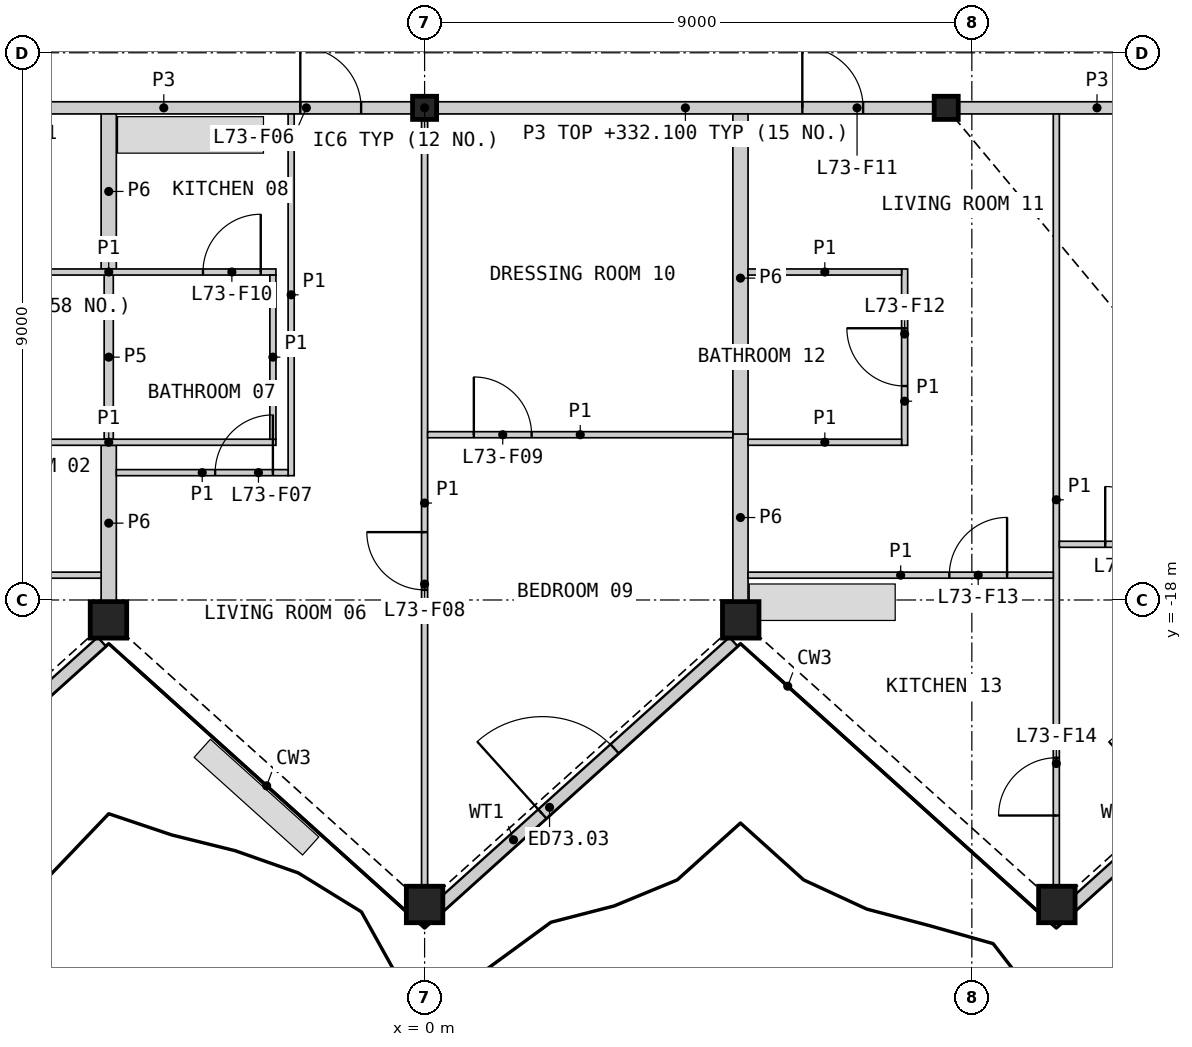
"""IFC4 building model, lengths in metres.
Left out: names, types, materials, properties, quantities, classifications, styles, units other than length and angle.
Written with IfcOpenShell. Run it as: python <this file> out.ifc"""

import sys

from ifc_helpers import new_model, si_unit, direction, frame, frame_2d, origin, origin_2d, place, context, subcontext, project, spatial, rectangle, hollow_rectangle, i_section, extrude, element, fill, save


model = new_model("IFC4")
c1 = context("Model", 3, precision=1e-05, world=origin(), true_north=direction((0.0, 1.0)))
c2 = subcontext(c1, "Body", "Model", "MODEL_VIEW")
j1 = project(units=[si_unit("LENGTHUNIT", "METRE"), si_unit("PLANEANGLEUNIT", "RADIAN")], contexts=[c1])
p1 = place(None, origin())
s1 = spatial("IfcSite", under=j1, at=p1, CompositionType="ELEMENT")
p2 = place(p1, origin())
s2 = spatial("IfcBuilding", under=s1, at=p2, CompositionType="ELEMENT")
p3 = place(p2, frame((0.0, 0.0, 329.0)))
s3 = spatial("IfcBuildingStorey", under=s2, at=p3, CompositionType="ELEMENT", Elevation=329.0)
for number, where, z_axis, x_axis in (
    (1, (-5.199, -18.327, 0.0), (0.0, 0.0, 1.0), (1.0, 0.0, 0.0)),
    (2, (0.0, -23.008, 0.0), (0.0, 0.0, 1.0), (1.0, 0.0, 0.0)),
    (3, (5.199, -18.327, 0.0), (0.0, 0.0, 1.0), (1.0, 0.0, 0.0)),
    (4, (10.398, -23.008, 0.0), (0.0, 0.0, 1.0), (1.0, 0.0, 0.0)),
):
    element("IfcColumn", number, at=place(p3, frame(where, z_axis=z_axis, x_axis=x_axis)), inside=s3, PredefinedType="COLUMN", context=c2, shape_type="SweptSolid", body=[
        extrude(hollow_rectangle(XDim=0.6, YDim=0.6, WallThickness=0.04, at=origin_2d()), origin(), (0.0, 0.0, 1.0), 3.4),
    ])
for number, where, z_axis, x_axis in (
    (5, (0.0, -9.906, 0.0), (0.0, 0.0, 1.0), (1.0, 0.0, 0.0)),
    (6, (8.578, -9.906, 0.0), (0.0, 0.0, 1.0), (1.0, 0.0, 0.0)),
):
    element("IfcColumn", number, at=place(p3, frame(where, z_axis=z_axis, x_axis=x_axis)), inside=s3, PredefinedType="COLUMN", context=c2, shape_type="SweptSolid", body=[
        extrude(i_section(OverallWidth=0.396, OverallDepth=0.381, WebThickness=0.019, FlangeThickness=0.03, at=origin_2d()), origin(), (0.0, 0.0, 1.0), 3.4),
    ])
p4 = place(p3, frame((-10.134, -23.031, 0.0), z_axis=(0.0, 0.0, 1.0), x_axis=(0.743138937876, 0.669137145145, 0.0)))
e7 = element("IfcWall", 7, at=p4, inside=s3, PredefinedType="SOLIDWALL", context=c2, shape_type="SweptSolid", body=[
    extrude(rectangle(XDim=6.493, YDim=0.2, at=frame_2d((3.246, 0.0))), origin(), (0.0, 0.0, 1.0), 2.488),
])
p5 = place(p4, frame((2.261, 0.0, 0.0)))
e8 = element("IfcOpeningElement", 8, at=p5, cuts=e7, PredefinedType="OPENING", context=c2, shape_type="SweptSolid", body=[
    extrude(rectangle(XDim=1.6, YDim=2.25, at=frame_2d((0.8, 1.125))), frame((0.0, 0.11, 0.0), z_axis=(0.0, -1.0, 0.0), x_axis=(1.0, 0.0, 0.0)), (0.0, 0.0, 1.0), 0.22),
])
p6 = place(p3, frame((0.256, -23.031, 0.0), z_axis=(0.0, 0.0, 1.0), x_axis=(0.743138937876, 0.669137145145, 0.0)))
e9 = element("IfcWall", 9, at=p6, inside=s3, PredefinedType="SOLIDWALL", context=c2, shape_type="SweptSolid", body=[
    extrude(rectangle(XDim=6.493, YDim=0.2, at=frame_2d((3.246, 0.0))), origin(), (0.0, 0.0, 1.0), 2.488),
])
p7 = place(p6, frame((2.261, 0.0, 0.0)))
e10 = element("IfcOpeningElement", 10, at=p7, cuts=e9, PredefinedType="OPENING", context=c2, shape_type="SweptSolid", body=[
    extrude(rectangle(XDim=1.6, YDim=2.25, at=frame_2d((0.8, 1.125))), frame((0.0, 0.11, 0.0), z_axis=(0.0, -1.0, 0.0), x_axis=(1.0, 0.0, 0.0)), (0.0, 0.0, 1.0), 0.22),
])
p8 = place(p3, frame((10.645, -23.031, 0.0), z_axis=(0.0, 0.0, 1.0), x_axis=(0.743138937876, 0.669137145145, 0.0)))
e11 = element("IfcWall", 11, at=p8, inside=s3, PredefinedType="SOLIDWALL", context=c2, shape_type="SweptSolid", body=[
    extrude(rectangle(XDim=6.493, YDim=0.2, at=frame_2d((3.246, 0.0))), origin(), (0.0, 0.0, 1.0), 2.488),
])
p9 = place(p8, frame((2.261, 0.0, 0.0)))
e12 = element("IfcOpeningElement", 12, at=p9, cuts=e11, PredefinedType="OPENING", context=c2, shape_type="SweptSolid", body=[
    extrude(rectangle(XDim=1.6, YDim=2.25, at=frame_2d((0.8, 1.125))), frame((0.0, 0.11, 0.0), z_axis=(0.0, -1.0, 0.0), x_axis=(1.0, 0.0, 0.0)), (0.0, 0.0, 1.0), 0.22),
])
p10 = place(p3, frame((0.208, -9.906, 0.0), z_axis=(0.0, 0.0, 1.0), x_axis=(1.0, 0.0, 0.0)))
e13 = element("IfcWall", 13, at=p10, inside=s3, PredefinedType="PARTITIONING", context=c2, shape_type="SweptSolid", body=[
    extrude(rectangle(XDim=8.163, YDim=0.2, at=frame_2d((4.082, 0.0))), origin(), (0.0, 0.0, 1.0), 3.1),
])
p11 = place(p10, frame((6.004, 0.0, 0.0)))
e14 = element("IfcOpeningElement", 14, at=p11, cuts=e13, PredefinedType="OPENING", context=c2, shape_type="SweptSolid", body=[
    extrude(rectangle(XDim=1.0, YDim=2.1, at=frame_2d((0.5, 1.05))), frame((0.0, 0.11, 0.0), z_axis=(0.0, -1.0, 0.0), x_axis=(1.0, 0.0, 0.0)), (0.0, 0.0, 1.0), 0.22),
])
p12 = place(p3, frame((-8.371, -9.906, 0.0), z_axis=(0.0, 0.0, 1.0), x_axis=(1.0, 0.0, 0.0)))
e15 = element("IfcWall", 15, at=p12, inside=s3, PredefinedType="PARTITIONING", context=c2, shape_type="SweptSolid", body=[
    extrude(rectangle(XDim=8.163, YDim=0.2, at=frame_2d((4.082, 0.0))), origin(), (0.0, 0.0, 1.0), 3.1),
])
p13 = place(p12, frame((1.159, 0.0, 0.0)))
e16 = element("IfcOpeningElement", 16, at=p13, cuts=e15, PredefinedType="OPENING", context=c2, shape_type="SweptSolid", body=[
    extrude(rectangle(XDim=1.0, YDim=2.1, at=frame_2d((0.5, 1.05))), frame((0.0, 0.11, 0.0), z_axis=(0.0, -1.0, 0.0), x_axis=(1.0, 0.0, 0.0)), (0.0, 0.0, 1.0), 0.22),
])
p14 = place(p12, frame((6.327, 0.0, 0.0)))
e17 = element("IfcOpeningElement", 17, at=p14, cuts=e15, PredefinedType="OPENING", context=c2, shape_type="SweptSolid", body=[
    extrude(rectangle(XDim=1.0, YDim=2.1, at=frame_2d((0.5, 1.05))), frame((0.0, 0.11, 0.0), z_axis=(0.0, -1.0, 0.0), x_axis=(1.0, 0.0, 0.0)), (0.0, 0.0, 1.0), 0.22),
])
p15 = place(p3, frame((5.195, -15.407, 0.0), z_axis=(0.0, 0.0, 1.0), x_axis=(0.0, 1.0, 0.0)))
e18 = element("IfcWall", 18, at=p15, inside=s3, PredefinedType="PARTITIONING", context=c2, shape_type="SweptSolid", body=[
    extrude(rectangle(XDim=5.401, YDim=0.25, at=frame_2d((2.701, 0.0))), origin(), (0.0, 0.0, 1.0), 2.33),
])
p16 = place(p3, frame((8.786, -9.906, 0.0), z_axis=(0.0, 0.0, 1.0), x_axis=(1.0, 0.0, 0.0)))
e19 = element("IfcWall", 19, at=p16, inside=s3, PredefinedType="PARTITIONING", context=c2, shape_type="SweptSolid", body=[
    extrude(rectangle(XDim=4.545, YDim=0.2, at=frame_2d((2.272, 0.0))), origin(), (0.0, 0.0, 1.0), 3.1),
])
p17 = place(p3, frame((-5.195, -12.556, 0.0), z_axis=(0.0, 0.0, 1.0), x_axis=(0.0, 1.0, 0.0)))
e20 = element("IfcWall", 20, at=p17, inside=s3, PredefinedType="PARTITIONING", context=c2, shape_type="SweptSolid", body=[
    extrude(rectangle(XDim=2.55, YDim=0.25, at=frame_2d((1.275, 0.0))), origin(), (0.0, 0.0, 1.0), 2.33),
])
p18 = place(p3, frame((5.195, -18.017, 0.0), z_axis=(0.0, 0.0, 1.0), x_axis=(0.0, 1.0, 0.0)))
e21 = element("IfcWall", 21, at=p18, inside=s3, PredefinedType="PARTITIONING", context=c2, shape_type="SweptSolid", body=[
    extrude(rectangle(XDim=2.746, YDim=0.25, at=frame_2d((1.373, 0.0))), origin(), (0.0, 0.0, 1.0), 2.33),
])
p19 = place(p3, frame((-5.195, -18.017, 0.0), z_axis=(0.0, 0.0, 1.0), x_axis=(0.0, 1.0, 0.0)))
e22 = element("IfcWall", 22, at=p19, inside=s3, PredefinedType="PARTITIONING", context=c2, shape_type="SweptSolid", body=[
    extrude(rectangle(XDim=2.561, YDim=0.25, at=frame_2d((1.281, 0.0))), origin(), (0.0, 0.0, 1.0), 2.33),
])
p20 = place(p3, frame((-5.195, -15.356, 0.0), z_axis=(0.0, 0.0, 1.0), x_axis=(0.0, 1.0, 0.0)))
e23 = element("IfcWall", 23, at=p20, inside=s3, PredefinedType="PLUMBINGWALL", context=c2, shape_type="SweptSolid", body=[
    extrude(rectangle(XDim=2.7, YDim=0.15, at=frame_2d((1.35, 0.0))), origin(), (0.0, 0.0, 1.0), 2.33),
])
p21 = place(p3, frame((10.389, -22.698, 0.0), z_axis=(0.0, 0.0, 1.0), x_axis=(0.0, 1.0, 0.0)))
e24 = element("IfcWall", 24, at=p21, inside=s3, PredefinedType="PARTITIONING", context=c2, shape_type="SweptSolid", body=[
    extrude(rectangle(XDim=12.692, YDim=0.1, at=frame_2d((6.346, 0.0))), origin(), (0.0, 0.0, 1.0), 2.33),
])
p22 = place(p21, frame((1.153, 0.0, 0.0)))
e25 = element("IfcOpeningElement", 25, at=p22, cuts=e24, PredefinedType="OPENING", context=c2, shape_type="SweptSolid", body=[
    extrude(rectangle(XDim=0.95, YDim=2.1, at=frame_2d((0.475, 1.05))), frame((0.0, 0.06, 0.0), z_axis=(0.0, -1.0, 0.0), x_axis=(1.0, 0.0, 0.0)), (0.0, 0.0, 1.0), 0.12),
])
p23 = place(p3, frame((0.0, -22.698, 0.0), z_axis=(0.0, 0.0, 1.0), x_axis=(0.0, 1.0, 0.0)))
e26 = element("IfcWall", 26, at=p23, inside=s3, PredefinedType="PARTITIONING", context=c2, shape_type="SweptSolid", body=[
    extrude(rectangle(XDim=12.585, YDim=0.1, at=frame_2d((6.292, 0.0))), origin(), (0.0, 0.0, 1.0), 2.33),
])
p24 = place(p23, frame((4.865, 0.0, 0.0)))
e27 = element("IfcOpeningElement", 27, at=p24, cuts=e26, PredefinedType="OPENING", context=c2, shape_type="SweptSolid", body=[
    extrude(rectangle(XDim=0.95, YDim=2.1, at=frame_2d((0.475, 1.05))), frame((0.0, 0.06, 0.0), z_axis=(0.0, -1.0, 0.0), x_axis=(1.0, 0.0, 0.0)), (0.0, 0.0, 1.0), 0.12),
])
p25 = place(p3, frame((10.439, -17.084, 0.0), z_axis=(0.0, 0.0, 1.0), x_axis=(1.0, 0.0, 0.0)))
e28 = element("IfcWall", 28, at=p25, inside=s3, PredefinedType="PARTITIONING", context=c2, shape_type="SweptSolid", body=[
    extrude(rectangle(XDim=6.693, YDim=0.1, at=frame_2d((3.346, 0.0))), origin(), (0.0, 0.0, 1.0), 2.33),
])
p26 = place(p25, frame((0.754, 0.0, 0.0)))
e29 = element("IfcOpeningElement", 29, at=p26, cuts=e28, PredefinedType="OPENING", context=c2, shape_type="SweptSolid", body=[
    extrude(rectangle(XDim=0.95, YDim=2.1, at=frame_2d((0.475, 1.05))), frame((0.0, 0.06, 0.0), z_axis=(0.0, -1.0, 0.0), x_axis=(1.0, 0.0, 0.0)), (0.0, 0.0, 1.0), 0.12),
])
p27 = place(p3, frame((-2.195, -15.956, 0.0), z_axis=(0.0, 0.0, 1.0), x_axis=(0.0, 1.0, 0.0)))
e30 = element("IfcWall", 30, at=p27, inside=s3, PredefinedType="PARTITIONING", context=c2, shape_type="SweptSolid", body=[
    extrude(rectangle(XDim=5.95, YDim=0.1, at=frame_2d((2.975, 0.0))), origin(), (0.0, 0.0, 1.0), 2.33),
])
p28 = place(p3, frame((-7.945, -12.606, 0.0), z_axis=(0.0, 0.0, 1.0), x_axis=(1.0, 0.0, 0.0)))
e31 = element("IfcWall", 31, at=p28, inside=s3, PredefinedType="PARTITIONING", context=c2, shape_type="SweptSolid", body=[
    extrude(rectangle(XDim=5.5, YDim=0.1, at=frame_2d((2.75, 0.0))), origin(), (0.0, 0.0, 1.0), 2.33),
])
p29 = place(p28, frame((4.3, 0.0, 0.0)))
e32 = element("IfcOpeningElement", 32, at=p29, cuts=e31, PredefinedType="OPENING", context=c2, shape_type="SweptSolid", body=[
    extrude(rectangle(XDim=0.95, YDim=2.1, at=frame_2d((0.475, 1.05))), frame((0.0, 0.06, 0.0), z_axis=(0.0, -1.0, 0.0), x_axis=(1.0, 0.0, 0.0)), (0.0, 0.0, 1.0), 0.12),
])
p30 = place(p3, frame((-7.945, -15.406, 0.0), z_axis=(0.0, 0.0, 1.0), x_axis=(1.0, 0.0, 0.0)))
e33 = element("IfcWall", 33, at=p30, inside=s3, PredefinedType="PARTITIONING", context=c2, shape_type="SweptSolid", body=[
    extrude(rectangle(XDim=5.5, YDim=0.1, at=frame_2d((2.75, 0.0))), origin(), (0.0, 0.0, 1.0), 2.33),
])
p31 = place(p3, frame((-10.339, -17.592, 0.0), z_axis=(0.0, 0.0, 1.0), x_axis=(1.0, 0.0, 0.0)))
e34 = element("IfcWall", 34, at=p31, inside=s3, PredefinedType="PARTITIONING", context=c2, shape_type="SweptSolid", body=[
    extrude(rectangle(XDim=5.02, YDim=0.1, at=frame_2d((2.51, 0.0))), origin(), (0.0, 0.0, 1.0), 2.33),
])
p32 = place(p31, frame((0.76, 0.0, 0.0)))
e35 = element("IfcOpeningElement", 35, at=p32, cuts=e34, PredefinedType="OPENING", context=c2, shape_type="SweptSolid", body=[
    extrude(rectangle(XDim=0.95, YDim=2.1, at=frame_2d((0.475, 1.05))), frame((0.0, 0.06, 0.0), z_axis=(0.0, -1.0, 0.0), x_axis=(1.0, 0.0, 0.0)), (0.0, 0.0, 1.0), 0.12),
])
p33 = place(p3, frame((5.32, -17.592, 0.0), z_axis=(0.0, 0.0, 1.0), x_axis=(1.0, 0.0, 0.0)))
e36 = element("IfcWall", 36, at=p33, inside=s3, PredefinedType="PARTITIONING", context=c2, shape_type="SweptSolid", body=[
    extrude(rectangle(XDim=5.02, YDim=0.1, at=frame_2d((2.51, 0.0))), origin(), (0.0, 0.0, 1.0), 2.33),
])
p34 = place(p33, frame((3.31, 0.0, 0.0)))
e37 = element("IfcOpeningElement", 37, at=p34, cuts=e36, PredefinedType="OPENING", context=c2, shape_type="SweptSolid", body=[
    extrude(rectangle(XDim=0.95, YDim=2.1, at=frame_2d((0.475, 1.05))), frame((0.0, 0.06, 0.0), z_axis=(0.0, -1.0, 0.0), x_axis=(1.0, 0.0, 0.0)), (0.0, 0.0, 1.0), 0.12),
])
p35 = place(p3, frame((0.05, -15.282, 0.0), z_axis=(0.0, 0.0, 1.0), x_axis=(1.0, 0.0, 0.0)))
e38 = element("IfcWall", 38, at=p35, inside=s3, PredefinedType="PARTITIONING", context=c2, shape_type="SweptSolid", body=[
    extrude(rectangle(XDim=5.02, YDim=0.1, at=frame_2d((2.51, 0.0))), origin(), (0.0, 0.0, 1.0), 2.33),
])
p36 = place(p35, frame((0.76, 0.0, 0.0)))
e39 = element("IfcOpeningElement", 39, at=p36, cuts=e38, PredefinedType="OPENING", context=c2, shape_type="SweptSolid", body=[
    extrude(rectangle(XDim=0.95, YDim=2.1, at=frame_2d((0.475, 1.05))), frame((0.0, 0.06, 0.0), z_axis=(0.0, -1.0, 0.0), x_axis=(1.0, 0.0, 0.0)), (0.0, 0.0, 1.0), 0.12),
])
p37 = place(p3, frame((-5.07, -15.906, 0.0), z_axis=(0.0, 0.0, 1.0), x_axis=(1.0, 0.0, 0.0)))
e40 = element("IfcWall", 40, at=p37, inside=s3, PredefinedType="PARTITIONING", context=c2, shape_type="SweptSolid", body=[
    extrude(rectangle(XDim=2.825, YDim=0.1, at=frame_2d((1.413, 0.0))), origin(), (0.0, 0.0, 1.0), 2.33),
])
p38 = place(p37, frame((1.625, 0.0, 0.0)))
e41 = element("IfcOpeningElement", 41, at=p38, cuts=e40, PredefinedType="OPENING", context=c2, shape_type="SweptSolid", body=[
    extrude(rectangle(XDim=0.95, YDim=2.1, at=frame_2d((0.475, 1.05))), frame((0.0, 0.06, 0.0), z_axis=(0.0, -1.0, 0.0), x_axis=(1.0, 0.0, 0.0)), (0.0, 0.0, 1.0), 0.12),
])
p39 = place(p3, frame((-2.495, -15.356, 0.0), z_axis=(0.0, 0.0, 1.0), x_axis=(0.0, 1.0, 0.0)))
e42 = element("IfcWall", 42, at=p39, inside=s3, PredefinedType="PARTITIONING", context=c2, shape_type="SweptSolid", body=[
    extrude(rectangle(XDim=2.7, YDim=0.1, at=frame_2d((1.35, 0.0))), origin(), (0.0, 0.0, 1.0), 2.33),
])
p40 = place(p3, frame((7.895, -15.456, 0.0), z_axis=(0.0, 0.0, 1.0), x_axis=(0.0, 1.0, 0.0)))
e43 = element("IfcWall", 43, at=p40, inside=s3, PredefinedType="PARTITIONING", context=c2, shape_type="SweptSolid", body=[
    extrude(rectangle(XDim=2.9, YDim=0.1, at=frame_2d((1.45, 0.0))), origin(), (0.0, 0.0, 1.0), 2.33),
])
p41 = place(p40, frame((0.975, 0.0, 0.0)))
e44 = element("IfcOpeningElement", 44, at=p41, cuts=e43, PredefinedType="OPENING", context=c2, shape_type="SweptSolid", body=[
    extrude(rectangle(XDim=0.95, YDim=2.1, at=frame_2d((0.475, 1.05))), frame((0.0, 0.06, 0.0), z_axis=(0.0, -1.0, 0.0), x_axis=(1.0, 0.0, 0.0)), (0.0, 0.0, 1.0), 0.12),
])
for number, where, z_axis, x_axis in (
    (45, (5.32, -12.606, 0.0), (0.0, 0.0, 1.0), (1.0, 0.0, 0.0)),
    (46, (5.32, -15.406, 0.0), (0.0, 0.0, 1.0), (1.0, 0.0, 0.0)),
):
    element("IfcWall", number, at=place(p3, frame(where, z_axis=z_axis, x_axis=x_axis)), inside=s3, PredefinedType="PARTITIONING", context=c2, shape_type="SweptSolid", body=[
        extrude(rectangle(XDim=2.525, YDim=0.1, at=frame_2d((1.263, 0.0))), origin(), (0.0, 0.0, 1.0), 2.33),
    ])
p42 = place(p7, origin())
e47 = element("IfcDoor", 47, at=p42, inside=s3, OperationType="DOUBLE_DOOR_SINGLE_SWING", PredefinedType="DOOR", context=c2, shape_type="SweptSolid", body=[
    extrude(rectangle(XDim=1.6, YDim=2.25, at=frame_2d((0.8, 1.125))), frame((0.0, 0.025, 0.0), z_axis=(0.0, -1.0, 0.0), x_axis=(1.0, 0.0, 0.0)), (0.0, 0.0, 1.0), 0.05),
])
fill(e10, e47)
p43 = place(p14, origin())
e48 = element("IfcDoor", 48, at=p43, inside=s3, OperationType="SINGLE_SWING_LEFT", PredefinedType="DOOR", context=c2, shape_type="SweptSolid", body=[
    extrude(rectangle(XDim=1.0, YDim=2.1, at=frame_2d((0.5, 1.05))), frame((0.0, 0.025, 0.0), z_axis=(0.0, -1.0, 0.0), x_axis=(1.0, 0.0, 0.0)), (0.0, 0.0, 1.0), 0.05),
])
fill(e17, e48)
p44 = place(p38, origin())
e49 = element("IfcDoor", 49, at=p44, inside=s3, OperationType="SINGLE_SWING_RIGHT", PredefinedType="DOOR", context=c2, shape_type="SweptSolid", body=[
    extrude(rectangle(XDim=0.95, YDim=2.1, at=frame_2d((0.475, 1.05))), frame((0.0, 0.025, 0.0), z_axis=(0.0, -1.0, 0.0), x_axis=(1.0, 0.0, 0.0)), (0.0, 0.0, 1.0), 0.05),
])
fill(e41, e49)
p45 = place(p24, origin())
e50 = element("IfcDoor", 50, at=p45, inside=s3, OperationType="SINGLE_SWING_RIGHT", PredefinedType="DOOR", context=c2, shape_type="SweptSolid", body=[
    extrude(rectangle(XDim=0.95, YDim=2.1, at=frame_2d((0.475, 1.05))), frame((0.0, 0.025, 0.0), z_axis=(0.0, -1.0, 0.0), x_axis=(1.0, 0.0, 0.0)), (0.0, 0.0, 1.0), 0.05),
])
fill(e27, e50)
p46 = place(p36, origin())
e51 = element("IfcDoor", 51, at=p46, inside=s3, OperationType="SINGLE_SWING_LEFT", PredefinedType="DOOR", context=c2, shape_type="SweptSolid", body=[
    extrude(rectangle(XDim=0.95, YDim=2.1, at=frame_2d((0.475, 1.05))), frame((0.0, 0.025, 0.0), z_axis=(0.0, -1.0, 0.0), x_axis=(1.0, 0.0, 0.0)), (0.0, 0.0, 1.0), 0.05),
])
fill(e39, e51)
p47 = place(p29, origin())
e52 = element("IfcDoor", 52, at=p47, inside=s3, OperationType="SINGLE_SWING_RIGHT", PredefinedType="DOOR", context=c2, shape_type="SweptSolid", body=[
    extrude(rectangle(XDim=0.95, YDim=2.1, at=frame_2d((0.475, 1.05))), frame((0.0, 0.025, 0.0), z_axis=(0.0, -1.0, 0.0), x_axis=(1.0, 0.0, 0.0)), (0.0, 0.0, 1.0), 0.05),
])
fill(e32, e52)
p48 = place(p11, origin())
e53 = element("IfcDoor", 53, at=p48, inside=s3, OperationType="SINGLE_SWING_LEFT", PredefinedType="DOOR", context=c2, shape_type="SweptSolid", body=[
    extrude(rectangle(XDim=1.0, YDim=2.1, at=frame_2d((0.5, 1.05))), frame((0.0, 0.025, 0.0), z_axis=(0.0, -1.0, 0.0), x_axis=(1.0, 0.0, 0.0)), (0.0, 0.0, 1.0), 0.05),
])
fill(e14, e53)
p49 = place(p41, origin())
e54 = element("IfcDoor", 54, at=p49, inside=s3, OperationType="SINGLE_SWING_RIGHT", PredefinedType="DOOR", context=c2, shape_type="SweptSolid", body=[
    extrude(rectangle(XDim=0.95, YDim=2.1, at=frame_2d((0.475, 1.05))), frame((0.0, 0.025, 0.0), z_axis=(0.0, -1.0, 0.0), x_axis=(1.0, 0.0, 0.0)), (0.0, 0.0, 1.0), 0.05),
])
fill(e44, e54)
p50 = place(p34, origin())
e55 = element("IfcDoor", 55, at=p50, inside=s3, OperationType="SINGLE_SWING_RIGHT", PredefinedType="DOOR", context=c2, shape_type="SweptSolid", body=[
    extrude(rectangle(XDim=0.95, YDim=2.1, at=frame_2d((0.475, 1.05))), frame((0.0, 0.025, 0.0), z_axis=(0.0, -1.0, 0.0), x_axis=(1.0, 0.0, 0.0)), (0.0, 0.0, 1.0), 0.05),
])
fill(e37, e55)
p51 = place(p22, origin())
e56 = element("IfcDoor", 56, at=p51, inside=s3, OperationType="SINGLE_SWING_LEFT", PredefinedType="DOOR", context=c2, shape_type="SweptSolid", body=[
    extrude(rectangle(XDim=0.95, YDim=2.1, at=frame_2d((0.475, 1.05))), frame((0.0, 0.025, 0.0), z_axis=(0.0, -1.0, 0.0), x_axis=(1.0, 0.0, 0.0)), (0.0, 0.0, 1.0), 0.05),
])
fill(e25, e56)
p52 = place(p26, origin())
e57 = element("IfcDoor", 57, at=p52, inside=s3, OperationType="SINGLE_SWING_LEFT", PredefinedType="DOOR", context=c2, shape_type="SweptSolid", body=[
    extrude(rectangle(XDim=0.95, YDim=2.1, at=frame_2d((0.475, 1.05))), frame((0.0, 0.025, 0.0), z_axis=(0.0, -1.0, 0.0), x_axis=(1.0, 0.0, 0.0)), (0.0, 0.0, 1.0), 0.05),
])
fill(e29, e57)
save(model, sys.argv[1])
